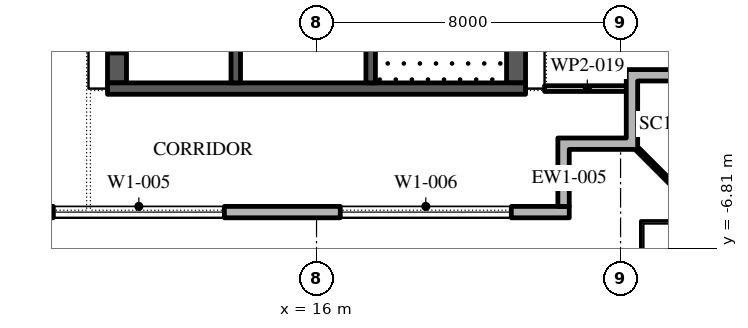
"""IFC4 building model, lengths in metres.
Left out: names, types, materials, properties, quantities, classifications, styles, units other than length and angle.
Written with IfcOpenShell. Run it as: python <this file> out.ifc"""

import sys

from ifc_helpers import new_model, si_unit, direction, frame, frame_2d, origin, place, context, subcontext, project, spatial, polyline, rectangle, outline, extrude, element, fill, save


model = new_model("IFC4")
c1 = context("Model", 3, precision=1e-05, world=origin(), true_north=direction((0.0, 1.0)))
c2 = subcontext(c1, "Body", "Model", "MODEL_VIEW")
j1 = project(units=[si_unit("LENGTHUNIT", "METRE"), si_unit("PLANEANGLEUNIT", "RADIAN")], contexts=[c1])
p1 = place(None, origin())
s1 = spatial("IfcSite", under=j1, at=p1, CompositionType="ELEMENT")
p2 = place(p1, origin())
s2 = spatial("IfcBuilding", under=s1, at=p2, CompositionType="ELEMENT")
p3 = place(p2, frame((0.0, 0.0, 325.8)))
s3 = spatial("IfcBuildingStorey", under=s2, at=p3, CompositionType="ELEMENT", Elevation=325.8)
p4 = place(p3, frame((-22.35, -5.85, 0.0), z_axis=(0.0, 0.0, 1.0), x_axis=(1.0, 0.0, 0.0)))
e1 = element("IfcWall", 1, at=p4, inside=s3, PredefinedType="STANDARD", context=c2, shape_type="SweptSolid", body=[
    extrude(rectangle(XDim=45.0, YDim=0.3, at=frame_2d((22.5, 0.0))), origin(), (0.0, 0.0, 1.0), 4.0),
])
p5 = place(p4, frame((1.375, 0.0, 0.45)))
e2 = element("IfcOpeningElement", 2, at=p5, cuts=e1, PredefinedType="OPENING", context=c2, shape_type="SweptSolid", body=[
    extrude(rectangle(XDim=4.5, YDim=3.05, at=frame_2d((2.25, 1.525))), frame((0.0, 0.16, 0.0), z_axis=(0.0, -1.0, 0.0), x_axis=(1.0, 0.0, 0.0)), (0.0, 0.0, 1.0), 0.32),
])
p6 = place(p4, frame((8.775, 0.0, 0.45)))
e3 = element("IfcOpeningElement", 3, at=p6, cuts=e1, PredefinedType="OPENING", context=c2, shape_type="SweptSolid", body=[
    extrude(rectangle(XDim=4.5, YDim=3.05, at=frame_2d((2.25, 1.525))), frame((0.0, 0.16, 0.0), z_axis=(0.0, -1.0, 0.0), x_axis=(1.0, 0.0, 0.0)), (0.0, 0.0, 1.0), 0.32),
])
p7 = place(p4, frame((17.375, 0.0, 0.0)))
e4 = element("IfcOpeningElement", 4, at=p7, cuts=e1, PredefinedType="OPENING", context=c2, shape_type="SweptSolid", body=[
    extrude(rectangle(XDim=2.4, YDim=3.5, at=frame_2d((1.2, 1.75))), frame((0.0, 0.16, 0.0), z_axis=(0.0, -1.0, 0.0), x_axis=(1.0, 0.0, 0.0)), (0.0, 0.0, 1.0), 0.32),
])
p8 = place(p4, frame((23.875, 0.0, 0.45)))
e5 = element("IfcOpeningElement", 5, at=p8, cuts=e1, PredefinedType="OPENING", context=c2, shape_type="SweptSolid", body=[
    extrude(rectangle(XDim=4.5, YDim=3.05, at=frame_2d((2.25, 1.525))), frame((0.0, 0.16, 0.0), z_axis=(0.0, -1.0, 0.0), x_axis=(1.0, 0.0, 0.0)), (0.0, 0.0, 1.0), 0.32),
])
p9 = place(p4, frame((31.425, 0.0, 0.45)))
e6 = element("IfcOpeningElement", 6, at=p9, cuts=e1, PredefinedType="OPENING", context=c2, shape_type="SweptSolid", body=[
    extrude(rectangle(XDim=4.5, YDim=3.05, at=frame_2d((2.25, 1.525))), frame((0.0, 0.16, 0.0), z_axis=(0.0, -1.0, 0.0), x_axis=(1.0, 0.0, 0.0)), (0.0, 0.0, 1.0), 0.32),
])
p10 = place(p4, frame((38.975, 0.0, 0.45)))
e7 = element("IfcOpeningElement", 7, at=p10, cuts=e1, PredefinedType="OPENING", context=c2, shape_type="SweptSolid", body=[
    extrude(rectangle(XDim=4.5, YDim=3.05, at=frame_2d((2.25, 1.525))), frame((0.0, 0.16, 0.0), z_axis=(0.0, -1.0, 0.0), x_axis=(1.0, 0.0, 0.0)), (0.0, 0.0, 1.0), 0.32),
])
p11 = place(p3, origin())
e8 = element("IfcWall", 8, at=p11, inside=s3, PredefinedType="STANDARD", context=c2, shape_type="SweptSolid", body=[
    extrude(outline(polyline([(24.15, -3.9), (24.15, -2.1), (26.25, -2.1), (26.25, -2.4), (24.45, -2.4), (24.45, -4.2), (22.65, -4.2), (22.65, -5.7), (22.35, -5.7), (22.35, -3.9), (24.15, -3.9)])), origin(), (0.0, 0.0, 1.0), 4.0),
])
p12 = place(p3, frame((24.45, -4.2, -0.05), z_axis=(0.0, 0.0, 1.0), x_axis=(0.707106781187, -0.707106781187, 0.0)))
e9 = element("IfcWall", 9, at=p12, inside=s3, PredefinedType="STANDARD", context=c2, shape_type="SweptSolid", body=[
    extrude(rectangle(XDim=2.667, YDim=0.1, at=frame_2d((1.333, 0.0))), origin(), (0.0, 0.0, 1.0), 4.05),
])
p13 = place(p3, frame((21.25, -2.45, 0.0), z_axis=(0.0, 0.0, 1.0), x_axis=(0.0, 1.0, 0.0)))
e10 = element("IfcWall", 10, at=p13, inside=s3, PredefinedType="SHEAR", context=c2, shape_type="SweptSolid", body=[
    extrude(rectangle(XDim=27.9, YDim=0.5, at=frame_2d((13.95, 0.0))), origin(), (0.0, 0.0, 1.0), 4.0),
])
p14 = place(p13, frame((5.05, 0.0, 0.0)))
e11 = element("IfcOpeningElement", 11, at=p14, cuts=e10, PredefinedType="OPENING", context=c2, shape_type="SweptSolid", body=[
    extrude(rectangle(XDim=1.2, YDim=2.1, at=frame_2d((0.6, 1.05))), frame((0.0, 0.26, 0.0), z_axis=(0.0, -1.0, 0.0), x_axis=(1.0, 0.0, 0.0)), (0.0, 0.0, 1.0), 0.52),
])
p15 = place(p13, frame((21.65, 0.0, 0.0)))
e12 = element("IfcOpeningElement", 12, at=p15, cuts=e10, PredefinedType="OPENING", context=c2, shape_type="SweptSolid", body=[
    extrude(rectangle(XDim=1.2, YDim=2.1, at=frame_2d((0.6, 1.05))), frame((0.0, 0.26, 0.0), z_axis=(0.0, -1.0, 0.0), x_axis=(1.0, 0.0, 0.0)), (0.0, 0.0, 1.0), 0.52),
])
p16 = place(p3, frame((10.75, -2.45, 0.0), z_axis=(0.0, 0.0, 1.0), x_axis=(0.0, 1.0, 0.0)))
e13 = element("IfcWall", 13, at=p16, inside=s3, PredefinedType="SHEAR", context=c2, shape_type="SweptSolid", body=[
    extrude(rectangle(XDim=27.9, YDim=0.5, at=frame_2d((13.95, 0.0))), origin(), (0.0, 0.0, 1.0), 4.0),
])
p17 = place(p16, frame((23.65, 0.0, 0.0)))
e14 = element("IfcOpeningElement", 14, at=p17, cuts=e13, PredefinedType="OPENING", context=c2, shape_type="SweptSolid", body=[
    extrude(rectangle(XDim=2.4, YDim=2.1, at=frame_2d((1.2, 1.05))), frame((0.0, 0.26, 0.0), z_axis=(0.0, -1.0, 0.0), x_axis=(1.0, 0.0, 0.0)), (0.0, 0.0, 1.0), 0.52),
])
p18 = place(p16, frame((0.788, 0.0, 0.0)))
e15 = element("IfcOpeningElement", 15, at=p18, cuts=e13, PredefinedType="OPENING", context=c2, shape_type="SweptSolid", body=[
    extrude(rectangle(XDim=0.9, YDim=2.1, at=frame_2d((0.45, 1.05))), frame((0.0, 0.26, 0.0), z_axis=(0.0, -1.0, 0.0), x_axis=(1.0, 0.0, 0.0)), (0.0, 0.0, 1.0), 0.52),
])
p19 = place(p16, frame((3.962, 0.0, 0.0)))
e16 = element("IfcOpeningElement", 16, at=p19, cuts=e13, PredefinedType="OPENING", context=c2, shape_type="SweptSolid", body=[
    extrude(rectangle(XDim=1.0, YDim=2.1, at=frame_2d((0.5, 1.05))), frame((0.0, 0.26, 0.0), z_axis=(0.0, -1.0, 0.0), x_axis=(1.0, 0.0, 0.0)), (0.0, 0.0, 1.0), 0.52),
])
p20 = place(p3, frame((10.5, -2.6, 0.0), z_axis=(0.0, 0.0, 1.0), x_axis=(1.0, 0.0, 0.0)))
e17 = element("IfcWall", 17, at=p20, inside=s3, PredefinedType="SHEAR", context=c2, shape_type="SweptSolid", body=[
    extrude(rectangle(XDim=11.0, YDim=0.3, at=frame_2d((5.5, 0.0))), origin(), (0.0, 0.0, 1.0), 4.0),
])
p21 = place(p3, frame((17.425, -2.45, 0.0), z_axis=(0.0, 0.0, 1.0), x_axis=(0.0, 1.0, 0.0)))
e18 = element("IfcWall", 18, at=p21, inside=s3, PredefinedType="SHEAR", context=c2, shape_type="SweptSolid", body=[
    extrude(rectangle(XDim=6.3, YDim=0.25, at=frame_2d((3.15, 0.0))), origin(), (0.0, 0.0, 1.0), 4.0),
])
p22 = place(p21, frame((5.05, 0.0, 0.0)))
e19 = element("IfcOpeningElement", 19, at=p22, cuts=e18, PredefinedType="OPENING", context=c2, shape_type="SweptSolid", body=[
    extrude(rectangle(XDim=1.2, YDim=2.1, at=frame_2d((0.6, 1.05))), frame((0.0, 0.135, 0.0), z_axis=(0.0, -1.0, 0.0), x_axis=(1.0, 0.0, 0.0)), (0.0, 0.0, 1.0), 0.27),
])
p23 = place(p3, frame((13.875, -2.45, 0.0), z_axis=(0.0, 0.0, 1.0), x_axis=(0.0, 1.0, 0.0)))
e20 = element("IfcWall", 20, at=p23, inside=s3, PredefinedType="SHEAR", context=c2, shape_type="SweptSolid", body=[
    extrude(rectangle(XDim=21.3, YDim=0.25, at=frame_2d((10.65, 0.0))), origin(), (0.0, 0.0, 1.0), 4.0),
])
p24 = place(p23, frame((11.357, 0.0, 0.0)))
e21 = element("IfcOpeningElement", 21, at=p24, cuts=e20, PredefinedType="OPENING", context=c2, shape_type="SweptSolid", body=[
    extrude(rectangle(XDim=0.9, YDim=2.1, at=frame_2d((0.45, 1.05))), frame((0.0, 0.135, 0.0), z_axis=(0.0, -1.0, 0.0), x_axis=(1.0, 0.0, 0.0)), (0.0, 0.0, 1.0), 0.27),
])
p25 = place(p23, frame((6.971, 0.0, 0.0)))
e22 = element("IfcOpeningElement", 22, at=p25, cuts=e20, PredefinedType="OPENING", context=c2, shape_type="SweptSolid", body=[
    extrude(rectangle(XDim=1.1, YDim=2.1, at=frame_2d((0.55, 1.05))), frame((0.0, 0.135, 0.0), z_axis=(0.0, -1.0, 0.0), x_axis=(1.0, 0.0, 0.0)), (0.0, 0.0, 1.0), 0.27),
])
p26 = place(p23, frame((15.543, 0.0, 0.0)))
e23 = element("IfcOpeningElement", 23, at=p26, cuts=e20, PredefinedType="OPENING", context=c2, shape_type="SweptSolid", body=[
    extrude(rectangle(XDim=1.1, YDim=2.1, at=frame_2d((0.55, 1.05))), frame((0.0, 0.135, 0.0), z_axis=(0.0, -1.0, 0.0), x_axis=(1.0, 0.0, 0.0)), (0.0, 0.0, 1.0), 0.27),
])
p27 = place(p23, frame((17.686, 0.0, 0.0)))
e24 = element("IfcOpeningElement", 24, at=p27, cuts=e20, PredefinedType="OPENING", context=c2, shape_type="SweptSolid", body=[
    extrude(rectangle(XDim=1.1, YDim=2.1, at=frame_2d((0.55, 1.05))), frame((0.0, 0.135, 0.0), z_axis=(0.0, -1.0, 0.0), x_axis=(1.0, 0.0, 0.0)), (0.0, 0.0, 1.0), 0.27),
])
p28 = place(p23, frame((19.829, 0.0, 0.0)))
e25 = element("IfcOpeningElement", 25, at=p28, cuts=e20, PredefinedType="OPENING", context=c2, shape_type="SweptSolid", body=[
    extrude(rectangle(XDim=1.1, YDim=2.1, at=frame_2d((0.55, 1.05))), frame((0.0, 0.135, 0.0), z_axis=(0.0, -1.0, 0.0), x_axis=(1.0, 0.0, 0.0)), (0.0, 0.0, 1.0), 0.27),
])
p29 = place(p3, frame((22.0, -2.6, 0.0), z_axis=(0.0, 0.0, 1.0), x_axis=(1.0, 0.0, 0.0)))
e26 = element("IfcWall", 26, at=p29, inside=s3, PredefinedType="PARTITIONING", context=c2, shape_type="SweptSolid", body=[
    extrude(rectangle(XDim=2.25, YDim=0.15, at=frame_2d((1.125, 0.0))), origin(), (0.0, 0.0, 1.0), 4.0),
])
p30 = place(p9, origin())
e27 = element("IfcWindow", 27, at=p30, inside=s3, PartitioningType="DOUBLE_PANEL_VERTICAL", PredefinedType="WINDOW", context=c2, shape_type="SweptSolid", body=[
    extrude(rectangle(XDim=4.5, YDim=3.05, at=frame_2d((2.25, 1.525))), frame((0.0, 0.03, 0.0), z_axis=(0.0, -1.0, 0.0), x_axis=(1.0, 0.0, 0.0)), (0.0, 0.0, 1.0), 0.06),
])
fill(e6, e27)
p31 = place(p10, origin())
e28 = element("IfcWindow", 28, at=p31, inside=s3, PartitioningType="DOUBLE_PANEL_VERTICAL", PredefinedType="WINDOW", context=c2, shape_type="SweptSolid", body=[
    extrude(rectangle(XDim=4.5, YDim=3.05, at=frame_2d((2.25, 1.525))), frame((0.0, 0.03, 0.0), z_axis=(0.0, -1.0, 0.0), x_axis=(1.0, 0.0, 0.0)), (0.0, 0.0, 1.0), 0.06),
])
fill(e7, e28)
p32 = place(p18, origin())
e29 = element("IfcDoor", 29, at=p32, inside=s3, OperationType="SINGLE_SWING_LEFT", PredefinedType="DOOR", context=c2, shape_type="SweptSolid", body=[
    extrude(rectangle(XDim=0.9, YDim=2.1, at=frame_2d((0.45, 1.05))), frame((0.0, -0.2, 0.0), z_axis=(0.0, -1.0, 0.0), x_axis=(1.0, 0.0, 0.0)), (0.0, 0.0, 1.0), 0.05),
])
fill(e15, e29)
save(model, sys.argv[1])
